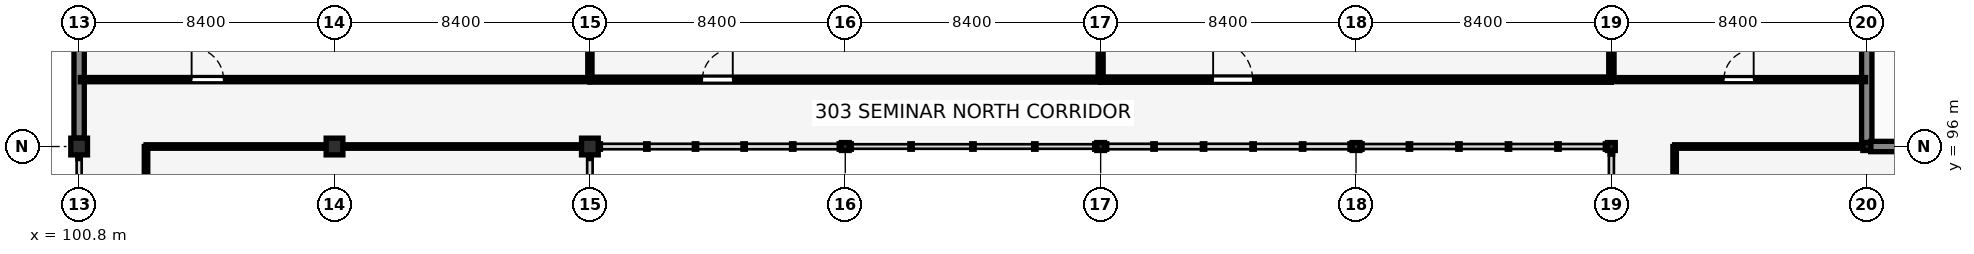
"""IFC4 building model, lengths in metres.
Left out: names, types, materials, properties, quantities, classifications, styles, units other than length and angle.
Written with IfcOpenShell. Run it as: python <this file> out.ifc"""

import sys

from ifc_helpers import new_model, si_unit, direction, frame, frame_2d, origin, origin_2d, place, context, subcontext, project, spatial, rectangle, i_section, extrude, element, fill, save


model = new_model("IFC4")
c1 = context("Model", 3, precision=1e-05, world=origin(), true_north=direction((0.0, 1.0)))
c2 = subcontext(c1, "Body", "Model", "MODEL_VIEW")
j1 = project(units=[si_unit("LENGTHUNIT", "METRE"), si_unit("PLANEANGLEUNIT", "RADIAN")], contexts=[c1])
p1 = place(None, origin())
s1 = spatial("IfcSite", under=j1, at=p1, CompositionType="ELEMENT")
p2 = place(p1, origin())
s2 = spatial("IfcBuilding", under=s1, at=p2, CompositionType="ELEMENT")
p3 = place(p2, frame((0.0, 0.0, 13.36)))
s3 = spatial("IfcBuildingStorey", under=s2, at=p3, CompositionType="ELEMENT", Elevation=13.36)
for number, where, z_axis, x_axis in (
    (1, (100.8, 96.0, 0.0), (0.0, 0.0, 1.0), (1.0, 0.0, 0.0)),
    (2, (109.2, 96.0, 0.0), (0.0, 0.0, 1.0), (1.0, 0.0, 0.0)),
    (3, (117.6, 96.0, 0.0), (0.0, 0.0, 1.0), (1.0, 0.0, 0.0)),
):
    element("IfcColumn", number, at=place(p3, frame(where, z_axis=z_axis, x_axis=x_axis)), inside=s3, PredefinedType="COLUMN", context=c2, shape_type="SweptSolid", body=[
        extrude(rectangle(XDim=0.55, YDim=0.55, at=origin_2d()), origin(), (0.0, 0.0, 1.0), 3.58),
    ])
for number, where, z_axis, x_axis in (
    (4, (126.0, 96.0, 0.0), (0.0, 0.0, 1.0), (1.0, 0.0, 0.0)),
    (5, (134.4, 96.0, 0.0), (0.0, 0.0, 1.0), (1.0, 0.0, 0.0)),
    (6, (142.8, 96.0, 0.0), (0.0, 0.0, 1.0), (1.0, 0.0, 0.0)),
    (7, (151.2, 96.0, 0.0), (0.0, 0.0, 1.0), (1.0, 0.0, 0.0)),
    (8, (159.6, 96.0, 0.0), (0.0, 0.0, 1.0), (1.0, 0.0, 0.0)),
):
    element("IfcColumn", number, at=place(p3, frame(where, z_axis=z_axis, x_axis=x_axis)), inside=s3, PredefinedType="COLUMN", context=c2, shape_type="SweptSolid", body=[
        extrude(i_section(OverallWidth=0.256, OverallDepth=0.26, WebThickness=0.01, FlangeThickness=0.017, FilletRadius=0.013, at=origin_2d()), origin(), (0.0, 0.0, 1.0), 3.58),
    ])
p4 = place(p3, frame((100.8, 96.275, 0.0), z_axis=(0.0, 0.0, 1.0), x_axis=(0.0, 1.0, 0.0)))
e9 = element("IfcWall", 9, at=p4, inside=s3, PredefinedType="SOLIDWALL", context=c2, shape_type="SweptSolid", body=[
    extrude(rectangle(XDim=7.595, YDim=0.34, at=frame_2d((3.797, 0.0))), origin(), (0.0, 0.0, 1.0), 3.28),
])
p5 = place(p4, frame((2.897, 0.0, 0.9), z_axis=(0.0, 0.0, 1.0), x_axis=(1.0, 0.0, 0.0)))
e10 = element("IfcOpeningElement", 10, at=p5, cuts=e9, PredefinedType="OPENING", context=c2, shape_type="SweptSolid", body=[
    extrude(rectangle(XDim=1.8, YDim=1.45, at=frame_2d((0.9, 0.725))), frame((0.0, 0.18, 0.0), z_axis=(0.0, -1.0, 0.0), x_axis=(1.0, 0.0, 0.0)), (0.0, 0.0, 1.0), 0.36),
])
p6 = place(p3, frame((159.6, 96.13, 0.0), z_axis=(0.0, 0.0, 1.0), x_axis=(0.0, 1.0, 0.0)))
e11 = element("IfcWall", 11, at=p6, inside=s3, PredefinedType="SOLIDWALL", context=c2, shape_type="SweptSolid", body=[
    extrude(rectangle(XDim=7.74, YDim=0.34, at=frame_2d((3.87, 0.0))), origin(), (0.0, 0.0, 1.0), 3.28),
])
p7 = place(p6, frame((3.395, 0.0, 0.65), z_axis=(0.0, 0.0, 1.0), x_axis=(1.0, 0.0, 0.0)))
e12 = element("IfcOpeningElement", 12, at=p7, cuts=e11, PredefinedType="OPENING", context=c2, shape_type="SweptSolid", body=[
    extrude(rectangle(XDim=0.95, YDim=2.1, at=frame_2d((0.475, 1.05))), frame((0.0, 0.18, 0.0), z_axis=(0.0, -1.0, 0.0), x_axis=(1.0, 0.0, 0.0)), (0.0, 0.0, 1.0), 0.36),
])
p8 = place(p3, frame((159.728, 96.0, 0.0), z_axis=(0.0, 0.0, 1.0), x_axis=(1.0, 0.0, 0.0)))
e13 = element("IfcWall", 13, at=p8, inside=s3, PredefinedType="SOLIDWALL", context=c2, shape_type="SweptSolid", body=[
    extrude(rectangle(XDim=8.144, YDim=0.34, at=frame_2d((4.072, 0.0))), origin(), (0.0, 0.0, 1.0), 3.28),
])
p9 = place(p8, frame((3.472, 0.0, 1.55), z_axis=(0.0, 0.0, 1.0), x_axis=(1.0, 0.0, 0.0)))
e14 = element("IfcOpeningElement", 14, at=p9, cuts=e13, PredefinedType="OPENING", context=c2, shape_type="SweptSolid", body=[
    extrude(rectangle(XDim=1.2, YDim=0.95, at=frame_2d((0.6, 0.475))), frame((0.0, 0.18, 0.0), z_axis=(0.0, -1.0, 0.0), x_axis=(1.0, 0.0, 0.0)), (0.0, 0.0, 1.0), 0.36),
])
p10 = place(p3, frame((100.84, 98.2, 0.0), z_axis=(0.0, 0.0, 1.0), x_axis=(1.0, 0.0, 0.0)))
e15 = element("IfcWall", 15, at=p10, inside=s3, PredefinedType="PARTITIONING", context=c2, shape_type="SweptSolid", body=[
    extrude(rectangle(XDim=16.76, YDim=0.14, at=frame_2d((8.38, 0.0))), origin(), (0.0, 0.0, 1.0), 3.58),
])
p11 = place(p10, frame((3.66, 0.0, 0.0), z_axis=(0.0, 0.0, 1.0), x_axis=(1.0, 0.0, 0.0)))
e16 = element("IfcOpeningElement", 16, at=p11, cuts=e15, PredefinedType="OPENING", context=c2, shape_type="SweptSolid", body=[
    extrude(rectangle(XDim=1.05, YDim=2.15, at=frame_2d((0.525, 1.075))), frame((0.0, 0.08, 0.0), z_axis=(0.0, -1.0, 0.0), x_axis=(1.0, 0.0, 0.0)), (0.0, 0.0, 1.0), 0.16),
])
p12 = place(p3, frame((117.6, 98.2, 0.0), z_axis=(0.0, 0.0, 1.0), x_axis=(1.0, 0.0, 0.0)))
e17 = element("IfcWall", 17, at=p12, inside=s3, PredefinedType="PARTITIONING", context=c2, shape_type="SweptSolid", body=[
    extrude(rectangle(XDim=16.8, YDim=0.165, at=frame_2d((8.4, 0.0))), origin(), (0.0, 0.0, 1.0), 3.58),
])
p13 = place(p12, frame((3.7, 0.0, 0.0), z_axis=(0.0, 0.0, 1.0), x_axis=(1.0, 0.0, 0.0)))
e18 = element("IfcOpeningElement", 18, at=p13, cuts=e17, PredefinedType="OPENING", context=c2, shape_type="SweptSolid", body=[
    extrude(rectangle(XDim=1.0, YDim=2.15, at=frame_2d((0.5, 1.075))), frame((0.0, 0.093, 0.0), z_axis=(0.0, -1.0, 0.0), x_axis=(1.0, 0.0, 0.0)), (0.0, 0.0, 1.0), 0.185),
])
p14 = place(p3, frame((134.4, 98.2, 0.0), z_axis=(0.0, 0.0, 1.0), x_axis=(1.0, 0.0, 0.0)))
e19 = element("IfcWall", 19, at=p14, inside=s3, PredefinedType="PARTITIONING", context=c2, shape_type="SweptSolid", body=[
    extrude(rectangle(XDim=16.8, YDim=0.175, at=frame_2d((8.4, 0.0))), origin(), (0.0, 0.0, 1.0), 3.126),
])
p15 = place(p14, frame((3.7, 0.0, 0.0), z_axis=(0.0, 0.0, 1.0), x_axis=(1.0, 0.0, 0.0)))
e20 = element("IfcOpeningElement", 20, at=p15, cuts=e19, PredefinedType="OPENING", context=c2, shape_type="SweptSolid", body=[
    extrude(rectangle(XDim=1.3, YDim=2.25, at=frame_2d((0.65, 1.125))), frame((0.0, 0.097, 0.0), z_axis=(0.0, -1.0, 0.0), x_axis=(1.0, 0.0, 0.0)), (0.0, 0.0, 1.0), 0.195),
])
p16 = place(p3, frame((151.2, 98.2, 0.0), z_axis=(0.0, 0.0, 1.0), x_axis=(1.0, 0.0, 0.0)))
e21 = element("IfcWall", 21, at=p16, inside=s3, PredefinedType="PARTITIONING", context=c2, shape_type="SweptSolid", body=[
    extrude(rectangle(XDim=8.36, YDim=0.135, at=frame_2d((4.18, 0.0))), origin(), (0.0, 0.0, 1.0), 3.58),
])
p17 = place(p16, frame((3.7, 0.0, 0.0), z_axis=(0.0, 0.0, 1.0), x_axis=(1.0, 0.0, 0.0)))
e22 = element("IfcOpeningElement", 22, at=p17, cuts=e21, PredefinedType="OPENING", context=c2, shape_type="SweptSolid", body=[
    extrude(rectangle(XDim=0.98, YDim=2.15, at=frame_2d((0.49, 1.075))), frame((0.0, 0.077, 0.0), z_axis=(0.0, -1.0, 0.0), x_axis=(1.0, 0.0, 0.0)), (0.0, 0.0, 1.0), 0.155),
])
p18 = place(p3, frame((103.0, 80.0, 0.0), z_axis=(0.0, 0.0, 1.0), x_axis=(0.0, 1.0, 0.0)))
e23 = element("IfcWall", 23, at=p18, inside=s3, PredefinedType="PARTITIONING", context=c2, shape_type="SweptSolid", body=[
    extrude(rectangle(XDim=16.0, YDim=0.115, at=frame_2d((8.0, 0.0))), origin(), (0.0, 0.0, 1.0), 3.58),
])
p19 = place(p18, frame((4.52, 0.0, 0.0), z_axis=(0.0, 0.0, 1.0), x_axis=(-1.0, 0.0, 0.0)))
e24 = element("IfcOpeningElement", 24, at=p19, cuts=e23, PredefinedType="OPENING", context=c2, shape_type="SweptSolid", body=[
    extrude(rectangle(XDim=1.02, YDim=2.16, at=frame_2d((0.51, 1.08))), frame((0.0, 0.067, 0.0), z_axis=(0.0, -1.0, 0.0), x_axis=(1.0, 0.0, 0.0)), (0.0, 0.0, 1.0), 0.135),
])
p20 = place(p3, frame((153.28, 80.0, 0.0), z_axis=(0.0, 0.0, 1.0), x_axis=(0.0, 1.0, 0.0)))
e25 = element("IfcWall", 25, at=p20, inside=s3, PredefinedType="PARTITIONING", context=c2, shape_type="SweptSolid", body=[
    extrude(rectangle(XDim=16.0, YDim=0.115, at=frame_2d((8.0, 0.0))), origin(), (0.0, 0.0, 1.0), 3.58),
])
p21 = place(p20, frame((4.52, 0.0, 0.0), z_axis=(0.0, 0.0, 1.0), x_axis=(-1.0, 0.0, 0.0)))
e26 = element("IfcOpeningElement", 26, at=p21, cuts=e25, PredefinedType="OPENING", context=c2, shape_type="SweptSolid", body=[
    extrude(rectangle(XDim=1.02, YDim=2.16, at=frame_2d((0.51, 1.08))), frame((0.0, 0.067, 0.0), z_axis=(0.0, -1.0, 0.0), x_axis=(1.0, 0.0, 0.0)), (0.0, 0.0, 1.0), 0.135),
])
p22 = place(p3, frame((117.6, 98.2, 0.0), z_axis=(0.0, 0.0, 1.0), x_axis=(0.0, 1.0, 0.0)))
e27 = element("IfcWall", 27, at=p22, inside=s3, PredefinedType="PARTITIONING", context=c2, shape_type="SweptSolid", body=[
    extrude(rectangle(XDim=5.68, YDim=0.14, at=frame_2d((2.84, 0.0))), origin(), (0.0, 0.0, 1.0), 3.126),
])
p23 = place(p3, frame((134.4, 98.2, 0.0), z_axis=(0.0, 0.0, 1.0), x_axis=(0.0, 1.0, 0.0)))
e28 = element("IfcWall", 28, at=p23, inside=s3, PredefinedType="PARTITIONING", context=c2, shape_type="SweptSolid", body=[
    extrude(rectangle(XDim=5.68, YDim=0.165, at=frame_2d((2.84, 0.0))), origin(), (0.0, 0.0, 1.0), 3.126),
])
p24 = place(p3, frame((151.2, 98.2, 0.0), z_axis=(0.0, 0.0, 1.0), x_axis=(0.0, 1.0, 0.0)))
e29 = element("IfcWall", 29, at=p24, inside=s3, PredefinedType="PARTITIONING", context=c2, shape_type="SweptSolid", body=[
    extrude(rectangle(XDim=5.68, YDim=0.175, at=frame_2d((2.84, 0.0))), origin(), (0.0, 0.0, 1.0), 3.126),
])
p25 = place(p3, frame((103.0, 96.0, 0.0), z_axis=(0.0, 0.0, 1.0), x_axis=(1.0, 0.0, 0.0)))
e30 = element("IfcWall", 30, at=p25, inside=s3, PredefinedType="PARTITIONING", context=c2, shape_type="SweptSolid", body=[
    extrude(rectangle(XDim=5.935, YDim=0.115, at=frame_2d((2.968, 0.0))), origin(), (0.0, 0.0, 1.0), 3.123),
])
p26 = place(p3, frame((109.465, 96.0, 0.0), z_axis=(0.0, 0.0, 1.0), x_axis=(1.0, 0.0, 0.0)))
e31 = element("IfcWall", 31, at=p26, inside=s3, PredefinedType="PARTITIONING", context=c2, shape_type="SweptSolid", body=[
    extrude(rectangle(XDim=7.87, YDim=0.115, at=frame_2d((3.935, 0.0))), origin(), (0.0, 0.0, 1.0), 3.123),
])
p27 = place(p3, frame((153.28, 96.0, 0.0), z_axis=(0.0, 0.0, 1.0), x_axis=(1.0, 0.0, 0.0)))
e32 = element("IfcWall", 32, at=p27, inside=s3, PredefinedType="PARTITIONING", context=c2, shape_type="SweptSolid", body=[
    extrude(rectangle(XDim=6.202, YDim=0.115, at=frame_2d((3.101, 0.0))), origin(), (0.0, 0.0, 1.0), 3.123),
])
p28 = place(p11, origin())
e33 = element("IfcDoor", 33, at=p28, inside=s3, OperationType="SINGLE_SWING_LEFT", PredefinedType="DOOR", context=c2, shape_type="SweptSolid", body=[
    extrude(rectangle(XDim=1.05, YDim=2.15, at=frame_2d((0.525, 1.075))), frame((0.0, 0.025, 0.0), z_axis=(0.0, -1.0, 0.0), x_axis=(1.0, 0.0, 0.0)), (0.0, 0.0, 1.0), 0.05),
])
fill(e16, e33)
p29 = place(p13, origin())
e34 = element("IfcDoor", 34, at=p29, inside=s3, OperationType="SINGLE_SWING_RIGHT", PredefinedType="DOOR", context=c2, shape_type="SweptSolid", body=[
    extrude(rectangle(XDim=1.0, YDim=2.15, at=frame_2d((0.5, 1.075))), frame((0.0, 0.025, 0.0), z_axis=(0.0, -1.0, 0.0), x_axis=(1.0, 0.0, 0.0)), (0.0, 0.0, 1.0), 0.05),
])
fill(e18, e34)
p30 = place(p15, origin())
e35 = element("IfcDoor", 35, at=p30, inside=s3, OperationType="SINGLE_SWING_LEFT", PredefinedType="DOOR", context=c2, shape_type="SweptSolid", body=[
    extrude(rectangle(XDim=1.3, YDim=2.25, at=frame_2d((0.65, 1.125))), frame((0.0, 0.025, 0.0), z_axis=(0.0, -1.0, 0.0), x_axis=(1.0, 0.0, 0.0)), (0.0, 0.0, 1.0), 0.05),
])
fill(e20, e35)
p31 = place(p17, origin())
e36 = element("IfcDoor", 36, at=p31, inside=s3, OperationType="SINGLE_SWING_RIGHT", PredefinedType="DOOR", context=c2, shape_type="SweptSolid", body=[
    extrude(rectangle(XDim=0.98, YDim=2.15, at=frame_2d((0.49, 1.075))), frame((0.0, 0.025, 0.0), z_axis=(0.0, -1.0, 0.0), x_axis=(1.0, 0.0, 0.0)), (0.0, 0.0, 1.0), 0.05),
])
fill(e22, e36)
save(model, sys.argv[1])
